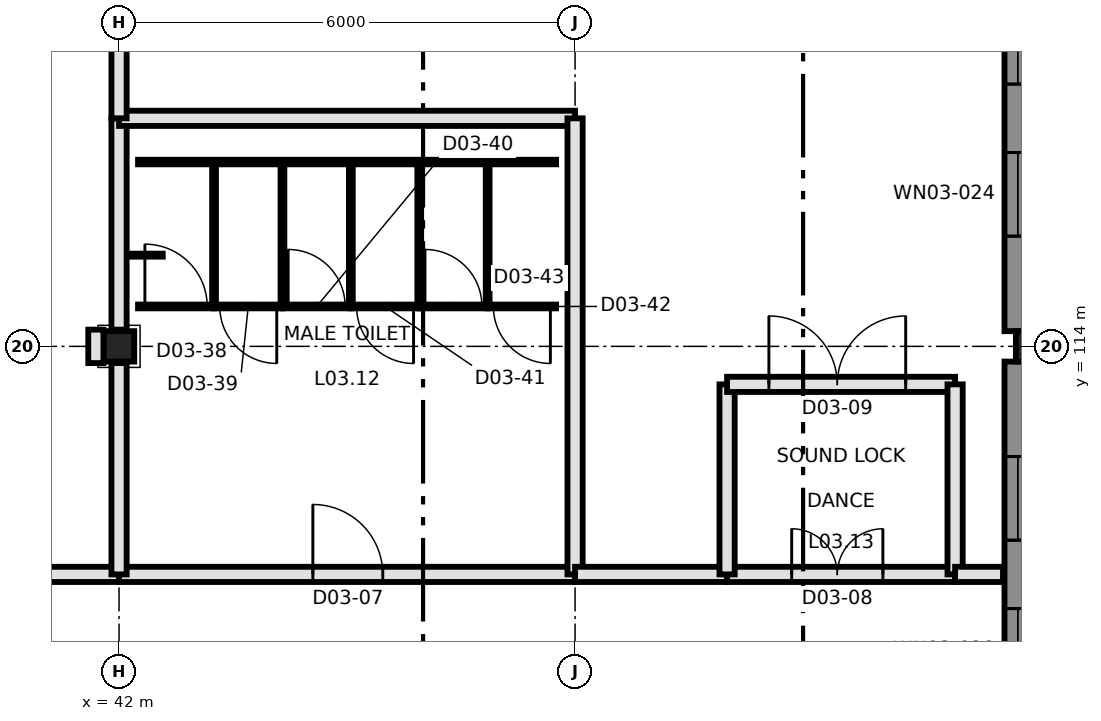
"""IFC4 building model, lengths in metres.
Left out: names, types, materials, properties, quantities, classifications, styles, units other than length and angle.
Written with IfcOpenShell. Run it as: python <this file> out.ifc"""

import sys

from ifc_helpers import new_model, si_unit, direction, frame, frame_2d, origin, origin_2d, place, context, subcontext, project, spatial, rectangle, extrude, element, fill, save


model = new_model("IFC4")
c1 = context("Model", 3, precision=1e-05, world=origin(), true_north=direction((0.0, 1.0)))
c2 = subcontext(c1, "Body", "Model", "MODEL_VIEW")
j1 = project(units=[si_unit("LENGTHUNIT", "METRE"), si_unit("PLANEANGLEUNIT", "RADIAN")], contexts=[c1])
p1 = place(None, origin())
s1 = spatial("IfcSite", under=j1, at=p1, CompositionType="ELEMENT")
p2 = place(p1, origin())
s2 = spatial("IfcBuilding", under=s1, at=p2, CompositionType="ELEMENT")
p3 = place(p2, frame((0.0, 0.0, 16.5)))
s3 = spatial("IfcBuildingStorey", under=s2, at=p3, CompositionType="ELEMENT", Elevation=16.5)
for number, where, z_axis, x_axis in (
    (1, (42.0, 114.0, 0.0), (0.0, 0.0, 1.0), (1.0, 0.0, 0.0)),
    (2, (54.0, 114.0, 0.0), (0.0, 0.0, 1.0), (1.0, 0.0, 0.0)),
):
    element("IfcColumn", number, at=place(p3, frame(where, z_axis=z_axis, x_axis=x_axis)), inside=s3, PredefinedType="COLUMN", context=c2, shape_type="SweptSolid", body=[
        extrude(rectangle(XDim=0.4, YDim=0.4, at=origin_2d()), origin(), (0.0, 0.0, 1.0), 11.5),
    ])
p4 = place(p3, frame((53.825, 119.8, 0.0), z_axis=(0.0, 0.0, 1.0), x_axis=(0.0, -1.0, 0.0)))
e3 = element("IfcWall", 3, at=p4, inside=s3, PredefinedType="SOLIDWALL", context=c2, shape_type="SweptSolid", body=[
    extrude(rectangle(XDim=5.6, YDim=0.35, at=frame_2d((2.8, 0.0))), origin(), (0.0, 0.0, 1.0), 10.9),
])
p5 = place(p4, frame((1.25, 0.0, 1.0)))
e4 = element("IfcOpeningElement", 4, at=p5, cuts=e3, PredefinedType="OPENING", context=c2, shape_type="SweptSolid", body=[
    extrude(rectangle(XDim=1.1, YDim=4.4, at=frame_2d((0.55, 2.2))), frame((0.0, 0.185, 0.0), z_axis=(0.0, -1.0, 0.0), x_axis=(1.0, 0.0, 0.0)), (0.0, 0.0, 1.0), 0.37),
])
p6 = place(p4, frame((3.25, 0.0, 1.0)))
e5 = element("IfcOpeningElement", 5, at=p6, cuts=e3, PredefinedType="OPENING", context=c2, shape_type="SweptSolid", body=[
    extrude(rectangle(XDim=1.1, YDim=4.4, at=frame_2d((0.55, 2.2))), frame((0.0, 0.185, 0.0), z_axis=(0.0, -1.0, 0.0), x_axis=(1.0, 0.0, 0.0)), (0.0, 0.0, 1.0), 0.37),
])
p7 = place(p4, frame((1.25, 0.0, 6.6)))
e6 = element("IfcOpeningElement", 6, at=p7, cuts=e3, PredefinedType="OPENING", context=c2, shape_type="SweptSolid", body=[
    extrude(rectangle(XDim=1.1, YDim=2.1, at=frame_2d((0.55, 1.05))), frame((0.0, 0.185, 0.0), z_axis=(0.0, -1.0, 0.0), x_axis=(1.0, 0.0, 0.0)), (0.0, 0.0, 1.0), 0.37),
])
p8 = place(p4, frame((3.25, 0.0, 6.6)))
e7 = element("IfcOpeningElement", 7, at=p8, cuts=e3, PredefinedType="OPENING", context=c2, shape_type="SweptSolid", body=[
    extrude(rectangle(XDim=1.1, YDim=2.1, at=frame_2d((0.55, 1.05))), frame((0.0, 0.185, 0.0), z_axis=(0.0, -1.0, 0.0), x_axis=(1.0, 0.0, 0.0)), (0.0, 0.0, 1.0), 0.37),
])
p9 = place(p3, frame((53.825, 113.8, 0.0), z_axis=(0.0, 0.0, 1.0), x_axis=(0.0, -1.0, 0.0)))
e8 = element("IfcWall", 8, at=p9, inside=s3, PredefinedType="SOLIDWALL", context=c2, shape_type="SweptSolid", body=[
    extrude(rectangle(XDim=5.6, YDim=0.35, at=frame_2d((2.8, 0.0))), origin(), (0.0, 0.0, 1.0), 10.9),
])
p10 = place(p9, frame((1.25, 0.0, 1.0)))
e9 = element("IfcOpeningElement", 9, at=p10, cuts=e8, PredefinedType="OPENING", context=c2, shape_type="SweptSolid", body=[
    extrude(rectangle(XDim=1.1, YDim=4.4, at=frame_2d((0.55, 2.2))), frame((0.0, 0.185, 0.0), z_axis=(0.0, -1.0, 0.0), x_axis=(1.0, 0.0, 0.0)), (0.0, 0.0, 1.0), 0.37),
])
p11 = place(p9, frame((3.25, 0.0, 1.0)))
e10 = element("IfcOpeningElement", 10, at=p11, cuts=e8, PredefinedType="OPENING", context=c2, shape_type="SweptSolid", body=[
    extrude(rectangle(XDim=1.1, YDim=4.4, at=frame_2d((0.55, 2.2))), frame((0.0, 0.185, 0.0), z_axis=(0.0, -1.0, 0.0), x_axis=(1.0, 0.0, 0.0)), (0.0, 0.0, 1.0), 0.37),
])
p12 = place(p9, frame((1.25, 0.0, 6.6)))
e11 = element("IfcOpeningElement", 11, at=p12, cuts=e8, PredefinedType="OPENING", context=c2, shape_type="SweptSolid", body=[
    extrude(rectangle(XDim=1.1, YDim=2.1, at=frame_2d((0.55, 1.05))), frame((0.0, 0.185, 0.0), z_axis=(0.0, -1.0, 0.0), x_axis=(1.0, 0.0, 0.0)), (0.0, 0.0, 1.0), 0.37),
])
p13 = place(p9, frame((3.25, 0.0, 6.6)))
e12 = element("IfcOpeningElement", 12, at=p13, cuts=e8, PredefinedType="OPENING", context=c2, shape_type="SweptSolid", body=[
    extrude(rectangle(XDim=1.1, YDim=2.1, at=frame_2d((0.55, 1.05))), frame((0.0, 0.185, 0.0), z_axis=(0.0, -1.0, 0.0), x_axis=(1.0, 0.0, 0.0)), (0.0, 0.0, 1.0), 0.37),
])
p14 = place(p3, frame((38.5, 111.0, 0.0), z_axis=(0.0, 0.0, 1.0), x_axis=(1.0, 0.0, 0.0)))
e13 = element("IfcWall", 13, at=p14, inside=s3, PredefinedType="PARTITIONING", context=c2, shape_type="SweptSolid", body=[
    extrude(rectangle(XDim=3.5, YDim=0.2, at=frame_2d((1.75, 0.0))), origin(), (0.0, 0.0, 1.0), 6.28),
])
p15 = place(p3, frame((42.0, 111.0, 0.0), z_axis=(0.0, 0.0, 1.0), x_axis=(1.0, 0.0, 0.0)))
e14 = element("IfcWall", 14, at=p15, inside=s3, PredefinedType="PARTITIONING", context=c2, shape_type="SweptSolid", body=[
    extrude(rectangle(XDim=6.0, YDim=0.2, at=frame_2d((3.0, 0.0))), origin(), (0.0, 0.0, 1.0), 6.28),
])
p16 = place(p15, frame((2.55, 0.0, 0.0)))
e15 = element("IfcOpeningElement", 15, at=p16, cuts=e14, PredefinedType="OPENING", context=c2, shape_type="SweptSolid", body=[
    extrude(rectangle(XDim=0.92, YDim=2.04, at=frame_2d((0.46, 1.02))), frame((0.0, 0.11, 0.0), z_axis=(0.0, -1.0, 0.0), x_axis=(1.0, 0.0, 0.0)), (0.0, 0.0, 1.0), 0.22),
])
for number, where, z_axis, x_axis in (
    (16, (42.0, 114.22, 0.0), (0.0, 0.0, 1.0), (0.0, 1.0, 0.0)),
    (17, (42.0, 111.0, 0.0), (0.0, 0.0, 1.0), (0.0, 1.0, 0.0)),
):
    element("IfcWall", number, at=place(p3, frame(where, z_axis=z_axis, x_axis=x_axis)), inside=s3, PredefinedType="PARTITIONING", context=c2, shape_type="SweptSolid", body=[
        extrude(rectangle(XDim=2.78, YDim=0.2, at=frame_2d((1.39, 0.0))), origin(), (0.0, 0.0, 1.0), 6.28),
    ])
p17 = place(p3, frame((41.695, 113.78, 0.0), z_axis=(0.0, 0.0, 1.0), x_axis=(0.0, 1.0, 0.0)))
e18 = element("IfcWall", 18, at=p17, inside=s3, PredefinedType="PARTITIONING", context=c2, shape_type="SweptSolid", body=[
    extrude(rectangle(XDim=0.44, YDim=0.2, at=frame_2d((0.22, 0.0))), origin(), (0.0, 0.0, 1.0), 6.28),
])
for number, where, z_axis, x_axis in (
    (19, (42.0, 117.0, 0.0), (0.0, 0.0, 1.0), (1.0, 0.0, 0.0)),
    (20, (48.0, 111.0, 0.0), (0.0, 0.0, 1.0), (0.0, 1.0, 0.0)),
):
    element("IfcWall", number, at=place(p3, frame(where, z_axis=z_axis, x_axis=x_axis)), inside=s3, PredefinedType="PARTITIONING", context=c2, shape_type="SweptSolid", body=[
        extrude(rectangle(XDim=6.0, YDim=0.2, at=frame_2d((3.0, 0.0))), origin(), (0.0, 0.0, 1.0), 6.28),
    ])
p18 = place(p3, frame((42.0, 117.0, 0.0), z_axis=(0.0, 0.0, 1.0), x_axis=(0.0, 1.0, 0.0)))
e21 = element("IfcWall", 21, at=p18, inside=s3, PredefinedType="PARTITIONING", context=c2, shape_type="SweptSolid", body=[
    extrude(rectangle(XDim=8.504, YDim=0.2, at=frame_2d((4.252, 0.0))), origin(), (0.0, 0.0, 1.0), 6.28),
])
p19 = place(p3, frame((48.0, 111.0, 0.0), z_axis=(0.0, 0.0, 1.0), x_axis=(1.0, 0.0, 0.0)))
e22 = element("IfcWall", 22, at=p19, inside=s3, PredefinedType="PARTITIONING", context=c2, shape_type="SweptSolid", body=[
    extrude(rectangle(XDim=2.0, YDim=0.2, at=frame_2d((1.0, 0.0))), origin(), (0.0, 0.0, 1.0), 6.28),
])
p20 = place(p3, frame((50.0, 111.0, 0.0), z_axis=(0.0, 0.0, 1.0), x_axis=(1.0, 0.0, 0.0)))
e23 = element("IfcWall", 23, at=p20, inside=s3, PredefinedType="PARTITIONING", context=c2, shape_type="SweptSolid", body=[
    extrude(rectangle(XDim=3.0, YDim=0.2, at=frame_2d((1.5, 0.0))), origin(), (0.0, 0.0, 1.0), 6.28),
])
p21 = place(p20, frame((0.85, 0.0, 0.0)))
e24 = element("IfcOpeningElement", 24, at=p21, cuts=e23, PredefinedType="OPENING", context=c2, shape_type="SweptSolid", body=[
    extrude(rectangle(XDim=1.2, YDim=2.1, at=frame_2d((0.6, 1.05))), frame((0.0, 0.11, 0.0), z_axis=(0.0, -1.0, 0.0), x_axis=(1.0, 0.0, 0.0)), (0.0, 0.0, 1.0), 0.22),
])
p22 = place(p3, frame((50.0, 111.0, 0.0), z_axis=(0.0, 0.0, 1.0), x_axis=(0.0, 1.0, 0.0)))
e25 = element("IfcWall", 25, at=p22, inside=s3, PredefinedType="PARTITIONING", context=c2, shape_type="SweptSolid", body=[
    extrude(rectangle(XDim=2.5, YDim=0.2, at=frame_2d((1.25, 0.0))), origin(), (0.0, 0.0, 1.0), 6.28),
])
p23 = place(p3, frame((50.0, 113.5, 0.0), z_axis=(0.0, 0.0, 1.0), x_axis=(1.0, 0.0, 0.0)))
e26 = element("IfcWall", 26, at=p23, inside=s3, PredefinedType="PARTITIONING", context=c2, shape_type="SweptSolid", body=[
    extrude(rectangle(XDim=3.0, YDim=0.2, at=frame_2d((1.5, 0.0))), origin(), (0.0, 0.0, 1.0), 6.28),
])
p24 = place(p23, frame((0.55, 0.0, 0.0)))
e27 = element("IfcOpeningElement", 27, at=p24, cuts=e26, PredefinedType="OPENING", context=c2, shape_type="SweptSolid", body=[
    extrude(rectangle(XDim=1.8, YDim=2.1, at=frame_2d((0.9, 1.05))), frame((0.0, 0.11, 0.0), z_axis=(0.0, -1.0, 0.0), x_axis=(1.0, 0.0, 0.0)), (0.0, 0.0, 1.0), 0.22),
])
p25 = place(p3, frame((53.0, 111.0, 0.0), z_axis=(0.0, 0.0, 1.0), x_axis=(0.0, 1.0, 0.0)))
e28 = element("IfcWall", 28, at=p25, inside=s3, PredefinedType="PARTITIONING", context=c2, shape_type="SweptSolid", body=[
    extrude(rectangle(XDim=2.5, YDim=0.2, at=frame_2d((1.25, 0.0))), origin(), (0.0, 0.0, 1.0), 6.28),
])
p26 = place(p3, frame((53.0, 111.0, 0.0), z_axis=(0.0, 0.0, 1.0), x_axis=(1.0, 0.0, 0.0)))
e29 = element("IfcWall", 29, at=p26, inside=s3, PredefinedType="PARTITIONING", context=c2, shape_type="SweptSolid", body=[
    extrude(rectangle(XDim=0.63, YDim=0.2, at=frame_2d((0.315, 0.0))), origin(), (0.0, 0.0, 1.0), 6.28),
])
p27 = place(p3, frame((42.25, 116.425, 0.0), z_axis=(0.0, 0.0, 1.0), x_axis=(1.0, 0.0, 0.0)))
e30 = element("IfcWall", 30, at=p27, inside=s3, PredefinedType="PARTITIONING", context=c2, shape_type="SweptSolid", body=[
    extrude(rectangle(XDim=5.5, YDim=0.06, at=frame_2d((2.75, 0.0))), origin(), (0.0, 0.0, 1.0), 2.1),
])
for number, where, z_axis, x_axis in (
    (31, (43.25, 114.525, 0.0), (0.0, 0.0, 1.0), (0.0, 1.0, 0.0)),
    (32, (44.15, 114.525, 0.0), (0.0, 0.0, 1.0), (0.0, 1.0, 0.0)),
    (33, (45.05, 114.525, 0.0), (0.0, 0.0, 1.0), (0.0, 1.0, 0.0)),
    (34, (45.95, 114.525, 0.0), (0.0, 0.0, 1.0), (0.0, 1.0, 0.0)),
    (35, (46.85, 114.525, 0.0), (0.0, 0.0, 1.0), (0.0, 1.0, 0.0)),
):
    element("IfcWall", number, at=place(p3, frame(where, z_axis=z_axis, x_axis=x_axis)), inside=s3, PredefinedType="PARTITIONING", context=c2, shape_type="SweptSolid", body=[
        extrude(rectangle(XDim=1.9, YDim=0.05, at=frame_2d((0.95, 0.0))), origin(), (0.0, 0.0, 1.0), 2.1),
    ])
p28 = place(p3, frame((42.25, 114.525, 0.0), z_axis=(0.0, 0.0, 1.0), x_axis=(1.0, 0.0, 0.0)))
e36 = element("IfcWall", 36, at=p28, inside=s3, PredefinedType="PARTITIONING", context=c2, shape_type="SweptSolid", body=[
    extrude(rectangle(XDim=1.0, YDim=0.05, at=frame_2d((0.5, 0.0))), origin(), (0.0, 0.0, 1.0), 2.1),
])
p29 = place(p28, frame((0.09, 0.0, 0.0)))
e37 = element("IfcOpeningElement", 37, at=p29, cuts=e36, PredefinedType="OPENING", context=c2, shape_type="SweptSolid", body=[
    extrude(rectangle(XDim=0.82, YDim=2.0, at=frame_2d((0.41, 1.0))), frame((0.0, 0.035, 0.0), z_axis=(0.0, -1.0, 0.0), x_axis=(1.0, 0.0, 0.0)), (0.0, 0.0, 1.0), 0.07),
])
p30 = place(p3, frame((43.25, 114.525, 0.0), z_axis=(0.0, 0.0, 1.0), x_axis=(1.0, 0.0, 0.0)))
e38 = element("IfcWall", 38, at=p30, inside=s3, PredefinedType="PARTITIONING", context=c2, shape_type="SweptSolid", body=[
    extrude(rectangle(XDim=0.9, YDim=0.05, at=frame_2d((0.45, 0.0))), origin(), (0.0, 0.0, 1.0), 2.1),
])
p31 = place(p30, frame((0.075, 0.0, 0.0)))
e39 = element("IfcOpeningElement", 39, at=p31, cuts=e38, PredefinedType="OPENING", context=c2, shape_type="SweptSolid", body=[
    extrude(rectangle(XDim=0.75, YDim=2.0, at=frame_2d((0.375, 1.0))), frame((0.0, 0.035, 0.0), z_axis=(0.0, -1.0, 0.0), x_axis=(1.0, 0.0, 0.0)), (0.0, 0.0, 1.0), 0.07),
])
p32 = place(p3, frame((44.15, 114.525, 0.0), z_axis=(0.0, 0.0, 1.0), x_axis=(1.0, 0.0, 0.0)))
e40 = element("IfcWall", 40, at=p32, inside=s3, PredefinedType="PARTITIONING", context=c2, shape_type="SweptSolid", body=[
    extrude(rectangle(XDim=0.9, YDim=0.05, at=frame_2d((0.45, 0.0))), origin(), (0.0, 0.0, 1.0), 2.1),
])
p33 = place(p32, frame((0.075, 0.0, 0.0)))
e41 = element("IfcOpeningElement", 41, at=p33, cuts=e40, PredefinedType="OPENING", context=c2, shape_type="SweptSolid", body=[
    extrude(rectangle(XDim=0.75, YDim=2.0, at=frame_2d((0.375, 1.0))), frame((0.0, 0.035, 0.0), z_axis=(0.0, -1.0, 0.0), x_axis=(1.0, 0.0, 0.0)), (0.0, 0.0, 1.0), 0.07),
])
p34 = place(p3, frame((45.05, 114.525, 0.0), z_axis=(0.0, 0.0, 1.0), x_axis=(1.0, 0.0, 0.0)))
e42 = element("IfcWall", 42, at=p34, inside=s3, PredefinedType="PARTITIONING", context=c2, shape_type="SweptSolid", body=[
    extrude(rectangle(XDim=0.9, YDim=0.05, at=frame_2d((0.45, 0.0))), origin(), (0.0, 0.0, 1.0), 2.1),
])
p35 = place(p34, frame((0.075, 0.0, 0.0)))
e43 = element("IfcOpeningElement", 43, at=p35, cuts=e42, PredefinedType="OPENING", context=c2, shape_type="SweptSolid", body=[
    extrude(rectangle(XDim=0.75, YDim=2.0, at=frame_2d((0.375, 1.0))), frame((0.0, 0.035, 0.0), z_axis=(0.0, -1.0, 0.0), x_axis=(1.0, 0.0, 0.0)), (0.0, 0.0, 1.0), 0.07),
])
p36 = place(p3, frame((45.95, 114.525, 0.0), z_axis=(0.0, 0.0, 1.0), x_axis=(1.0, 0.0, 0.0)))
e44 = element("IfcWall", 44, at=p36, inside=s3, PredefinedType="PARTITIONING", context=c2, shape_type="SweptSolid", body=[
    extrude(rectangle(XDim=0.9, YDim=0.05, at=frame_2d((0.45, 0.0))), origin(), (0.0, 0.0, 1.0), 2.1),
])
p37 = place(p36, frame((0.075, 0.0, 0.0)))
e45 = element("IfcOpeningElement", 45, at=p37, cuts=e44, PredefinedType="OPENING", context=c2, shape_type="SweptSolid", body=[
    extrude(rectangle(XDim=0.75, YDim=2.0, at=frame_2d((0.375, 1.0))), frame((0.0, 0.035, 0.0), z_axis=(0.0, -1.0, 0.0), x_axis=(1.0, 0.0, 0.0)), (0.0, 0.0, 1.0), 0.07),
])
p38 = place(p3, frame((46.85, 114.525, 0.0), z_axis=(0.0, 0.0, 1.0), x_axis=(1.0, 0.0, 0.0)))
e46 = element("IfcWall", 46, at=p38, inside=s3, PredefinedType="PARTITIONING", context=c2, shape_type="SweptSolid", body=[
    extrude(rectangle(XDim=0.9, YDim=0.05, at=frame_2d((0.45, 0.0))), origin(), (0.0, 0.0, 1.0), 2.1),
])
p39 = place(p38, frame((0.075, 0.0, 0.0)))
e47 = element("IfcOpeningElement", 47, at=p39, cuts=e46, PredefinedType="OPENING", context=c2, shape_type="SweptSolid", body=[
    extrude(rectangle(XDim=0.75, YDim=2.0, at=frame_2d((0.375, 1.0))), frame((0.0, 0.035, 0.0), z_axis=(0.0, -1.0, 0.0), x_axis=(1.0, 0.0, 0.0)), (0.0, 0.0, 1.0), 0.07),
])
p40 = place(p3, frame((42.125, 115.2, 0.0), z_axis=(0.0, 0.0, 1.0), x_axis=(1.0, 0.0, 0.0)))
e48 = element("IfcWall", 48, at=p40, inside=s3, PredefinedType="PARTITIONING", context=c2, shape_type="SweptSolid", body=[
    extrude(rectangle(XDim=0.45, YDim=0.04, at=frame_2d((0.225, 0.0))), origin(), (0.0, 0.0, 1.0), 1.8),
])
p41 = place(p5, origin())
e49 = element("IfcWindow", 49, at=p41, inside=s3, PartitioningType="SINGLE_PANEL", PredefinedType="WINDOW", context=c2, shape_type="SweptSolid", body=[
    extrude(rectangle(XDim=1.1, YDim=4.4, at=frame_2d((0.55, 2.2))), frame((0.0, 0.03, 0.0), z_axis=(0.0, -1.0, 0.0), x_axis=(1.0, 0.0, 0.0)), (0.0, 0.0, 1.0), 0.06),
])
fill(e4, e49)
p42 = place(p6, origin())
e50 = element("IfcWindow", 50, at=p42, inside=s3, PartitioningType="SINGLE_PANEL", PredefinedType="WINDOW", context=c2, shape_type="SweptSolid", body=[
    extrude(rectangle(XDim=1.1, YDim=4.4, at=frame_2d((0.55, 2.2))), frame((0.0, 0.03, 0.0), z_axis=(0.0, -1.0, 0.0), x_axis=(1.0, 0.0, 0.0)), (0.0, 0.0, 1.0), 0.06),
])
fill(e5, e50)
p43 = place(p7, origin())
e51 = element("IfcWindow", 51, at=p43, inside=s3, PartitioningType="SINGLE_PANEL", PredefinedType="WINDOW", context=c2, shape_type="SweptSolid", body=[
    extrude(rectangle(XDim=1.1, YDim=2.1, at=frame_2d((0.55, 1.05))), frame((0.0, 0.03, 0.0), z_axis=(0.0, -1.0, 0.0), x_axis=(1.0, 0.0, 0.0)), (0.0, 0.0, 1.0), 0.06),
])
fill(e6, e51)
p44 = place(p8, origin())
e52 = element("IfcWindow", 52, at=p44, inside=s3, PartitioningType="SINGLE_PANEL", PredefinedType="WINDOW", context=c2, shape_type="SweptSolid", body=[
    extrude(rectangle(XDim=1.1, YDim=2.1, at=frame_2d((0.55, 1.05))), frame((0.0, 0.03, 0.0), z_axis=(0.0, -1.0, 0.0), x_axis=(1.0, 0.0, 0.0)), (0.0, 0.0, 1.0), 0.06),
])
fill(e7, e52)
p45 = place(p10, origin())
e53 = element("IfcWindow", 53, at=p45, inside=s3, PartitioningType="SINGLE_PANEL", PredefinedType="WINDOW", context=c2, shape_type="SweptSolid", body=[
    extrude(rectangle(XDim=1.1, YDim=4.4, at=frame_2d((0.55, 2.2))), frame((0.0, 0.03, 0.0), z_axis=(0.0, -1.0, 0.0), x_axis=(1.0, 0.0, 0.0)), (0.0, 0.0, 1.0), 0.06),
])
fill(e9, e53)
p46 = place(p11, origin())
e54 = element("IfcWindow", 54, at=p46, inside=s3, PartitioningType="SINGLE_PANEL", PredefinedType="WINDOW", context=c2, shape_type="SweptSolid", body=[
    extrude(rectangle(XDim=1.1, YDim=4.4, at=frame_2d((0.55, 2.2))), frame((0.0, 0.03, 0.0), z_axis=(0.0, -1.0, 0.0), x_axis=(1.0, 0.0, 0.0)), (0.0, 0.0, 1.0), 0.06),
])
fill(e10, e54)
p47 = place(p12, origin())
e55 = element("IfcWindow", 55, at=p47, inside=s3, PartitioningType="SINGLE_PANEL", PredefinedType="WINDOW", context=c2, shape_type="SweptSolid", body=[
    extrude(rectangle(XDim=1.1, YDim=2.1, at=frame_2d((0.55, 1.05))), frame((0.0, 0.03, 0.0), z_axis=(0.0, -1.0, 0.0), x_axis=(1.0, 0.0, 0.0)), (0.0, 0.0, 1.0), 0.06),
])
fill(e11, e55)
p48 = place(p13, origin())
e56 = element("IfcWindow", 56, at=p48, inside=s3, PartitioningType="SINGLE_PANEL", PredefinedType="WINDOW", context=c2, shape_type="SweptSolid", body=[
    extrude(rectangle(XDim=1.1, YDim=2.1, at=frame_2d((0.55, 1.05))), frame((0.0, 0.03, 0.0), z_axis=(0.0, -1.0, 0.0), x_axis=(1.0, 0.0, 0.0)), (0.0, 0.0, 1.0), 0.06),
])
fill(e12, e56)
p49 = place(p16, origin())
e57 = element("IfcDoor", 57, at=p49, inside=s3, OperationType="SINGLE_SWING_LEFT", PredefinedType="DOOR", context=c2, shape_type="SweptSolid", body=[
    extrude(rectangle(XDim=0.92, YDim=2.04, at=frame_2d((0.46, 1.02))), frame((0.0, 0.025, 0.0), z_axis=(0.0, -1.0, 0.0), x_axis=(1.0, 0.0, 0.0)), (0.0, 0.0, 1.0), 0.05),
])
fill(e15, e57)
p50 = place(p21, origin())
e58 = element("IfcDoor", 58, at=p50, inside=s3, OperationType="DOUBLE_DOOR_SINGLE_SWING", PredefinedType="DOOR", context=c2, shape_type="SweptSolid", body=[
    extrude(rectangle(XDim=1.2, YDim=2.1, at=frame_2d((0.6, 1.05))), frame((0.0, 0.025, 0.0), z_axis=(0.0, -1.0, 0.0), x_axis=(1.0, 0.0, 0.0)), (0.0, 0.0, 1.0), 0.05),
])
fill(e24, e58)
p51 = place(p24, frame((1.8, 0.0, 0.0), z_axis=(0.0, 0.0, 1.0), x_axis=(-1.0, 0.0, 0.0)))
e59 = element("IfcDoor", 59, at=p51, inside=s3, OperationType="DOUBLE_DOOR_SINGLE_SWING", PredefinedType="DOOR", context=c2, shape_type="SweptSolid", body=[
    extrude(rectangle(XDim=1.8, YDim=2.1, at=frame_2d((0.9, 1.05))), frame((0.0, 0.025, 0.0), z_axis=(0.0, -1.0, 0.0), x_axis=(1.0, 0.0, 0.0)), (0.0, 0.0, 1.0), 0.05),
])
fill(e27, e59)
p52 = place(p29, origin())
e60 = element("IfcDoor", 60, at=p52, inside=s3, OperationType="SINGLE_SWING_LEFT", PredefinedType="DOOR", context=c2, shape_type="SweptSolid", body=[
    extrude(rectangle(XDim=0.82, YDim=2.0, at=frame_2d((0.41, 1.0))), frame((0.0, 0.025, 0.0), z_axis=(0.0, -1.0, 0.0), x_axis=(1.0, 0.0, 0.0)), (0.0, 0.0, 1.0), 0.05),
])
fill(e37, e60)
p53 = place(p31, origin())
e61 = element("IfcDoor", 61, at=p53, inside=s3, OperationType="SINGLE_SWING_RIGHT", PredefinedType="DOOR", context=c2, shape_type="SweptSolid", body=[
    extrude(rectangle(XDim=0.75, YDim=2.0, at=frame_2d((0.375, 1.0))), frame((0.0, 0.025, 0.0), z_axis=(0.0, -1.0, 0.0), x_axis=(1.0, 0.0, 0.0)), (0.0, 0.0, 1.0), 0.05),
])
fill(e39, e61)
p54 = place(p33, origin())
e62 = element("IfcDoor", 62, at=p54, inside=s3, OperationType="SINGLE_SWING_LEFT", PredefinedType="DOOR", context=c2, shape_type="SweptSolid", body=[
    extrude(rectangle(XDim=0.75, YDim=2.0, at=frame_2d((0.375, 1.0))), frame((0.0, 0.025, 0.0), z_axis=(0.0, -1.0, 0.0), x_axis=(1.0, 0.0, 0.0)), (0.0, 0.0, 1.0), 0.05),
])
fill(e41, e62)
p55 = place(p35, origin())
e63 = element("IfcDoor", 63, at=p55, inside=s3, OperationType="SINGLE_SWING_RIGHT", PredefinedType="DOOR", context=c2, shape_type="SweptSolid", body=[
    extrude(rectangle(XDim=0.75, YDim=2.0, at=frame_2d((0.375, 1.0))), frame((0.0, 0.025, 0.0), z_axis=(0.0, -1.0, 0.0), x_axis=(1.0, 0.0, 0.0)), (0.0, 0.0, 1.0), 0.05),
])
fill(e43, e63)
p56 = place(p37, origin())
e64 = element("IfcDoor", 64, at=p56, inside=s3, OperationType="SINGLE_SWING_LEFT", PredefinedType="DOOR", context=c2, shape_type="SweptSolid", body=[
    extrude(rectangle(XDim=0.75, YDim=2.0, at=frame_2d((0.375, 1.0))), frame((0.0, 0.025, 0.0), z_axis=(0.0, -1.0, 0.0), x_axis=(1.0, 0.0, 0.0)), (0.0, 0.0, 1.0), 0.05),
])
fill(e45, e64)
p57 = place(p39, origin())
e65 = element("IfcDoor", 65, at=p57, inside=s3, OperationType="SINGLE_SWING_RIGHT", PredefinedType="DOOR", context=c2, shape_type="SweptSolid", body=[
    extrude(rectangle(XDim=0.75, YDim=2.0, at=frame_2d((0.375, 1.0))), frame((0.0, 0.025, 0.0), z_axis=(0.0, -1.0, 0.0), x_axis=(1.0, 0.0, 0.0)), (0.0, 0.0, 1.0), 0.05),
])
fill(e47, e65)
save(model, sys.argv[1])
